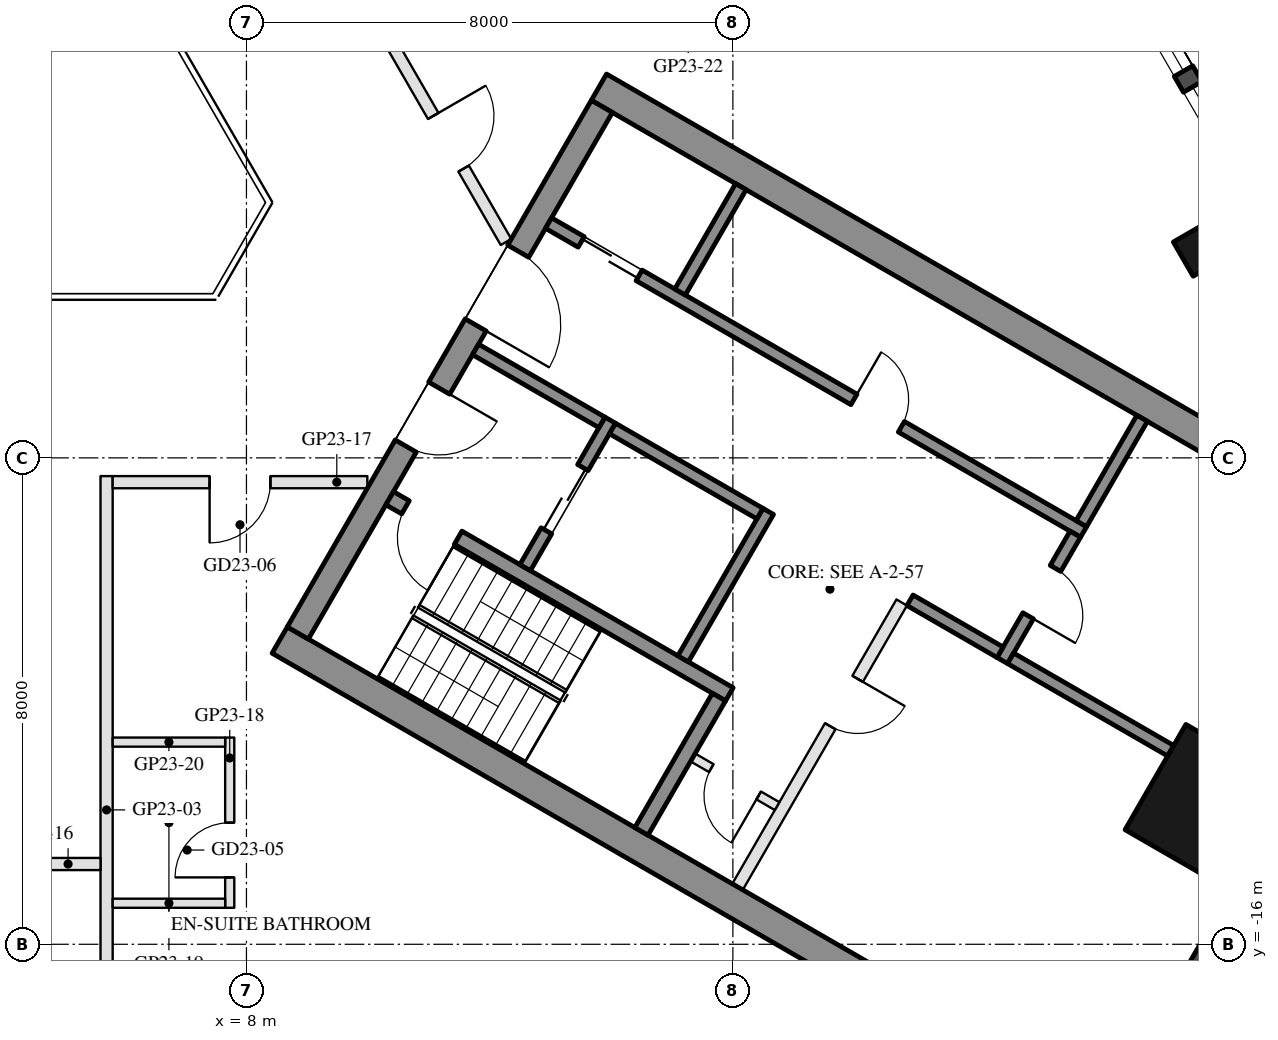
"""IFC4 building model, lengths in metres.
Left out: names, types, materials, properties, quantities, classifications, styles, units other than length and angle.
Written with IfcOpenShell. Run it as: python <this file> out.ifc"""

import sys

from ifc_helpers import new_model, si_unit, direction, frame, frame_2d, origin, origin_2d, place, context, subcontext, project, spatial, rectangle, hollow_rectangle, extrude, element, fill, save


model = new_model("IFC4")
c1 = context("Model", 3, precision=1e-05, world=origin(), true_north=direction((0.0, 1.0)))
c2 = subcontext(c1, "Body", "Model", "MODEL_VIEW")
j1 = project(units=[si_unit("LENGTHUNIT", "METRE"), si_unit("PLANEANGLEUNIT", "RADIAN")], contexts=[c1])
p1 = place(None, origin())
s1 = spatial("IfcSite", under=j1, at=p1, CompositionType="ELEMENT")
p2 = place(p1, origin())
s2 = spatial("IfcBuilding", under=s1, at=p2, CompositionType="ELEMENT")
p3 = place(p2, frame((0.0, 0.0, 246.7)))
s3 = spatial("IfcBuildingStorey", under=s2, at=p3, CompositionType="ELEMENT", Elevation=246.7)
p4 = place(p3, frame((23.688, -4.568, 0.0), z_axis=(0.0, 0.0, 1.0), x_axis=(-0.5, 0.866025403784, 0.0)))
e1 = element("IfcColumn", 1, at=p4, inside=s3, PredefinedType="COLUMN", context=c2, shape_type="SweptSolid", body=[
    extrude(hollow_rectangle(XDim=0.65, YDim=0.65, WallThickness=0.03, at=origin_2d()), origin(), (0.0, 0.0, 1.0), 3.7),
])
p5 = place(p3, frame((23.816, -13.75, 0.0), z_axis=(0.0, 0.0, 1.0), x_axis=(0.5, 0.866025403784, 0.0)))
e2 = element("IfcColumn", 2, at=p5, inside=s3, PredefinedType="COLUMN", context=c2, shape_type="SweptSolid", body=[
    extrude(hollow_rectangle(XDim=2.0, YDim=2.0, WallThickness=0.05, at=origin_2d()), origin(), (0.0, 0.0, 1.0), 3.7),
])
p6 = place(p3, frame((23.427, -16.792, 0.0), z_axis=(0.0, 0.0, 1.0), x_axis=(0.500018773155, 0.866014564827, 0.0)))
e3 = element("IfcWall", 3, at=p6, inside=s3, PredefinedType="SOLIDWALL", context=c2, shape_type="SweptSolid", body=[
    extrude(rectangle(XDim=5.658, YDim=0.35, at=frame_2d((2.829, 0.0))), origin(), (0.0, 0.0, 1.0), 3.55),
])
p7 = place(p3, frame((26.257, -6.567, 0.0), z_axis=(0.0, 0.0, 1.0), x_axis=(-0.500023526245, 0.866011820475, 0.0)))
e4 = element("IfcWall", 4, at=p7, inside=s3, PredefinedType="SOLIDWALL", context=c2, shape_type="SweptSolid", body=[
    extrude(rectangle(XDim=11.816, YDim=0.35, at=frame_2d((5.908, 0.0))), origin(), (0.0, 0.0, 1.0), 3.55),
])
p8 = place(p7, frame((0.38, 0.0, 0.3)))
e5 = element("IfcOpeningElement", 5, at=p8, cuts=e4, PredefinedType="OPENING", context=c2, shape_type="SweptSolid", body=[
    extrude(rectangle(XDim=1.9, YDim=2.65, at=frame_2d((0.95, 1.325))), frame((0.0, 0.185, 0.0), z_axis=(0.0, -1.0, 0.0), x_axis=(1.0, 0.0, 0.0)), (0.0, 0.0, 1.0), 0.37),
])
p9 = place(p7, frame((7.841, 0.0, 0.0)))
e6 = element("IfcOpeningElement", 6, at=p9, cuts=e4, PredefinedType="OPENING", context=c2, shape_type="SweptSolid", body=[
    extrude(rectangle(XDim=2.4, YDim=2.4, at=frame_2d((1.2, 1.2))), frame((0.0, 0.185, 0.0), z_axis=(0.0, -1.0, 0.0), x_axis=(1.0, 0.0, 0.0)), (0.0, 0.0, 1.0), 0.37),
])
p10 = place(p7, frame((3.691, 0.0, 0.3)))
e7 = element("IfcOpeningElement", 7, at=p10, cuts=e4, PredefinedType="OPENING", context=c2, shape_type="SweptSolid", body=[
    extrude(rectangle(XDim=1.7, YDim=2.65, at=frame_2d((0.85, 1.325))), frame((0.0, 0.185, 0.0), z_axis=(0.0, -1.0, 0.0), x_axis=(1.0, 0.0, 0.0)), (0.0, 0.0, 1.0), 0.37),
])
p11 = place(p7, frame((5.691, 0.0, 0.3)))
e8 = element("IfcOpeningElement", 8, at=p11, cuts=e4, PredefinedType="OPENING", context=c2, shape_type="SweptSolid", body=[
    extrude(rectangle(XDim=1.7, YDim=2.65, at=frame_2d((0.85, 1.325))), frame((0.0, 0.185, 0.0), z_axis=(0.0, -1.0, 0.0), x_axis=(1.0, 0.0, 0.0)), (0.0, 0.0, 1.0), 0.37),
])
for number, where, z_axis, x_axis in (
    (9, (8.547, -10.997, 0.0), (0.0, 0.0, 1.0), (0.866, -0.5, 0.0)),
    (10, (13.797, -1.903, 0.0), (0.0, 0.0, 1.0), (0.866, -0.5, 0.0)),
):
    element("IfcWall", number, at=place(p3, frame(where, z_axis=z_axis, x_axis=x_axis)), inside=s3, PredefinedType="SHEAR", context=c2, shape_type="SweptSolid", body=[
        extrude(rectangle(XDim=14.837, YDim=0.5, at=frame_2d((7.418, 0.0))), origin(), (0.0, 0.0, 1.0), 3.5),
    ])
p12 = place(p3, frame((8.845, -10.88, 0.0), z_axis=(0.0, 0.0, 1.0), x_axis=(0.500004234368, 0.866022959057, 0.0)))
e11 = element("IfcWall", 11, at=p12, inside=s3, PredefinedType="SHEAR", context=c2, shape_type="SweptSolid", body=[
    extrude(rectangle(XDim=10.0, YDim=0.4, at=frame_2d((5.0, 0.0))), origin(), (0.0, 0.0, 1.0), 3.5),
])
p13 = place(p12, frame((3.55, 0.0, 0.0)))
e12 = element("IfcOpeningElement", 12, at=p13, cuts=e11, PredefinedType="OPENING", context=c2, shape_type="SweptSolid", body=[
    extrude(rectangle(XDim=1.1, YDim=2.1, at=frame_2d((0.55, 1.05))), frame((0.0, 0.21, 0.0), z_axis=(0.0, -1.0, 0.0), x_axis=(1.0, 0.0, 0.0)), (0.0, 0.0, 1.0), 0.42),
])
p14 = place(p12, frame((5.85, 0.0, 0.0)))
e13 = element("IfcOpeningElement", 13, at=p14, cuts=e11, PredefinedType="OPENING", context=c2, shape_type="SweptSolid", body=[
    extrude(rectangle(XDim=1.4, YDim=2.1, at=frame_2d((0.7, 1.05))), frame((0.0, 0.21, 0.0), z_axis=(0.0, -1.0, 0.0), x_axis=(1.0, 0.0, 0.0)), (0.0, 0.0, 1.0), 0.42),
])
p15 = place(p3, frame((10.356, -8.664, 0.0), z_axis=(0.0, 0.0, 1.0), x_axis=(0.866028629588, -0.499994412703, 0.0)))
e14 = element("IfcWall", 14, at=p15, inside=s3, PredefinedType="SHEAR", context=c2, shape_type="SweptSolid", body=[
    extrude(rectangle(XDim=6.45, YDim=0.25, at=frame_2d((3.225, 0.0))), origin(), (0.0, 0.0, 1.0), 3.5),
])
p16 = place(p15, frame((0.3, 0.0, 0.0)))
e15 = element("IfcOpeningElement", 15, at=p16, cuts=e14, PredefinedType="OPENING", context=c2, shape_type="SweptSolid", body=[
    extrude(rectangle(XDim=1.0, YDim=2.1, at=frame_2d((0.5, 1.05))), frame((0.0, 0.135, 0.0), z_axis=(0.0, -1.0, 0.0), x_axis=(1.0, 0.0, 0.0)), (0.0, 0.0, 1.0), 0.27),
])
p17 = place(p3, frame((14.496, -14.143, 0.0), z_axis=(0.0, 0.0, 1.0), x_axis=(0.500062241894, 0.865989465428, 0.0)))
e16 = element("IfcWall", 16, at=p17, inside=s3, PredefinedType="SHEAR", context=c2, shape_type="SweptSolid", body=[
    extrude(rectangle(XDim=2.55, YDim=0.25, at=frame_2d((1.275, 0.0))), origin(), (0.0, 0.0, 1.0), 3.5),
])
p18 = place(p3, frame((15.181, -11.305, 0.0), z_axis=(0.0, 0.0, 1.0), x_axis=(0.49994636267, 0.866056369097, 0.0)))
e17 = element("IfcWall", 17, at=p18, inside=s3, PredefinedType="SHEAR", context=c2, shape_type="SweptSolid", body=[
    extrude(rectangle(XDim=2.8, YDim=0.2, at=frame_2d((1.4, 0.0))), origin(), (0.0, 0.0, 1.0), 3.5),
])
p19 = place(p3, frame((12.583, -9.805, 0.0), z_axis=(0.0, 0.0, 1.0), x_axis=(0.49994636267, 0.866056369097, 0.0)))
e18 = element("IfcWall", 18, at=p19, inside=s3, PredefinedType="SHEAR", context=c2, shape_type="SweptSolid", body=[
    extrude(rectangle(XDim=2.8, YDim=0.2, at=frame_2d((1.4, 0.0))), origin(), (0.0, 0.0, 1.0), 3.5),
])
p20 = place(p19, frame((0.7, 0.0, 0.0)))
e19 = element("IfcOpeningElement", 19, at=p20, cuts=e18, PredefinedType="OPENING", context=c2, shape_type="SweptSolid", body=[
    extrude(rectangle(XDim=1.2, YDim=2.1, at=frame_2d((0.6, 1.05))), frame((0.0, 0.11, 0.0), z_axis=(0.0, -1.0, 0.0), x_axis=(1.0, 0.0, 0.0)), (0.0, 0.0, 1.0), 0.22),
])
p21 = place(p3, frame((11.768, -6.217, 0.0), z_axis=(0.0, 0.0, 1.0), x_axis=(0.866050077142, -0.499957262057, 0.0)))
e20 = element("IfcWall", 20, at=p21, inside=s3, PredefinedType="SHEAR", context=c2, shape_type="SweptSolid", body=[
    extrude(rectangle(XDim=2.4, YDim=0.2, at=frame_2d((1.2, 0.0))), origin(), (0.0, 0.0, 1.0), 3.5),
])
p22 = place(p3, frame((14.02, -7.517, 0.0), z_axis=(0.0, 0.0, 1.0), x_axis=(0.866034573852, -0.49998411664, 0.0)))
e21 = element("IfcWall", 21, at=p22, inside=s3, PredefinedType="SHEAR", context=c2, shape_type="SweptSolid", body=[
    extrude(rectangle(XDim=2.8, YDim=0.2, at=frame_2d((1.4, 0.0))), origin(), (0.0, 0.0, 1.0), 3.5),
])
p23 = place(p3, frame((12.968, -4.138, 0.0), z_axis=(0.0, 0.0, 1.0), x_axis=(0.866028328073, -0.49999493495, 0.0)))
e22 = element("IfcWall", 22, at=p23, inside=s3, PredefinedType="SHEAR", context=c2, shape_type="SweptSolid", body=[
    extrude(rectangle(XDim=10.16, YDim=0.2, at=frame_2d((5.08, 0.0))), origin(), (0.0, 0.0, 1.0), 3.5),
])
p24 = place(p23, frame((0.62, 0.0, 0.0)))
e23 = element("IfcOpeningElement", 23, at=p24, cuts=e22, PredefinedType="OPENING", context=c2, shape_type="SweptSolid", body=[
    extrude(rectangle(XDim=1.1, YDim=2.1, at=frame_2d((0.55, 1.05))), frame((0.0, 0.11, 0.0), z_axis=(0.0, -1.0, 0.0), x_axis=(1.0, 0.0, 0.0)), (0.0, 0.0, 1.0), 0.22),
])
p25 = place(p23, frame((5.8, 0.0, 0.0)))
e24 = element("IfcOpeningElement", 24, at=p25, cuts=e22, PredefinedType="OPENING", context=c2, shape_type="SweptSolid", body=[
    extrude(rectangle(XDim=0.9, YDim=2.1, at=frame_2d((0.45, 1.05))), frame((0.0, 0.11, 0.0), z_axis=(0.0, -1.0, 0.0), x_axis=(1.0, 0.0, 0.0)), (0.0, 0.0, 1.0), 0.22),
])
p26 = place(p3, frame((20.43, -11.333, 0.0), z_axis=(0.0, 0.0, 1.0), x_axis=(0.500001309137, 0.866024647952, 0.0)))
e25 = element("IfcWall", 25, at=p26, inside=s3, PredefinedType="SHEAR", context=c2, shape_type="SweptSolid", body=[
    extrude(rectangle(XDim=2.4, YDim=0.2, at=frame_2d((1.2, 0.0))), origin(), (0.0, 0.0, 1.0), 3.5),
])
p27 = place(p26, frame((0.85, 0.0, 0.0)))
e26 = element("IfcOpeningElement", 26, at=p27, cuts=e25, PredefinedType="OPENING", context=c2, shape_type="SweptSolid", body=[
    extrude(rectangle(XDim=0.9, YDim=2.1, at=frame_2d((0.45, 1.05))), frame((0.0, 0.11, 0.0), z_axis=(0.0, -1.0, 0.0), x_axis=(1.0, 0.0, 0.0)), (0.0, 0.0, 1.0), 0.22),
])
p28 = place(p3, frame((18.913, -10.342, 0.0), z_axis=(0.0, 0.0, 1.0), x_axis=(0.866038183914, -0.499977863513, 0.0)))
e27 = element("IfcWall", 27, at=p28, inside=s3, PredefinedType="SHEAR", context=c2, shape_type="SweptSolid", body=[
    extrude(rectangle(XDim=1.71, YDim=0.2, at=frame_2d((0.855, 0.0))), origin(), (0.0, 0.0, 1.0), 3.5),
])
for number, where, z_axis, x_axis in (
    (28, (15.131, -5.272, 0.0), (0.0, 0.0, 1.0), (0.5, 0.866, 0.0)),
    (29, (21.73, -9.082, 0.0), (0.0, 0.0, 1.0), (0.5, 0.866, 0.0)),
):
    element("IfcWall", number, at=place(p3, frame(where, z_axis=z_axis, x_axis=x_axis)), inside=s3, PredefinedType="SHEAR", context=c2, shape_type="SweptSolid", body=[
        extrude(rectangle(XDim=2.0, YDim=0.2, at=frame_2d((1.0, 0.0))), origin(), (0.0, 0.0, 1.0), 3.5),
    ])
p29 = place(p3, frame((20.567, -11.297, 0.0), z_axis=(0.0, 0.0, 1.0), x_axis=(0.866065229334, -0.49993101378, 0.0)))
e30 = element("IfcWall", 30, at=p29, inside=s3, PredefinedType="SHEAR", context=c2, shape_type="SweptSolid", body=[
    extrude(rectangle(XDim=3.04, YDim=0.2, at=frame_2d((1.52, 0.0))), origin(), (0.0, 0.0, 1.0), 3.5),
])
p30 = place(p3, frame((16.076, -15.055, 0.0), z_axis=(0.0, 0.0, 1.0), x_axis=(0.499995103361, 0.866028230842, 0.0)))
e31 = element("IfcWall", 31, at=p30, inside=s3, PredefinedType="PARTITIONING", context=c2, shape_type="SweptSolid", body=[
    extrude(rectangle(XDim=5.4, YDim=0.2, at=frame_2d((2.7, 0.0))), origin(), (0.0, 0.0, 1.0), 3.5),
])
p31 = place(p30, frame((3.05, 0.0, 0.0)))
e32 = element("IfcOpeningElement", 32, at=p31, cuts=e31, PredefinedType="OPENING", context=c2, shape_type="SweptSolid", body=[
    extrude(rectangle(XDim=0.9, YDim=2.1, at=frame_2d((0.45, 1.05))), frame((0.0, 0.11, 0.0), z_axis=(0.0, -1.0, 0.0), x_axis=(1.0, 0.0, 0.0)), (0.0, 0.0, 1.0), 0.22),
])
p32 = place(p3, frame((15.342, -12.928, 0.0), z_axis=(0.0, 0.0, 1.0), x_axis=(0.865989903783, -0.500061482766, 0.0)))
e33 = element("IfcWall", 33, at=p32, inside=s3, PredefinedType="PARTITIONING", context=c2, shape_type="SweptSolid", body=[
    extrude(rectangle(XDim=1.6, YDim=0.15, at=frame_2d((0.8, 0.0))), origin(), (0.0, 0.0, 1.0), 3.5),
])
p33 = place(p32, frame((0.35, 0.0, 0.0)))
e34 = element("IfcOpeningElement", 34, at=p33, cuts=e33, PredefinedType="OPENING", context=c2, shape_type="SweptSolid", body=[
    extrude(rectangle(XDim=0.9, YDim=2.1, at=frame_2d((0.45, 1.05))), frame((0.0, 0.085, 0.0), z_axis=(0.0, -1.0, 0.0), x_axis=(1.0, 0.0, 0.0)), (0.0, 0.0, 1.0), 0.17),
])
p34 = place(p3, frame((5.7, -19.28, 0.0), z_axis=(0.0, 0.0, 1.0), x_axis=(0.0, 1.0, 0.0)))
e35 = element("IfcWall", 35, at=p34, inside=s3, PredefinedType="PARTITIONING", context=c2, shape_type="SweptSolid", body=[
    extrude(rectangle(XDim=10.98, YDim=0.2, at=frame_2d((5.49, 0.0))), origin(), (0.0, 0.0, 1.0), 3.16),
])
p35 = place(p3, frame((5.6, -14.68, 0.0), z_axis=(0.0, 0.0, 1.0), x_axis=(-1.0, 0.0, 0.0)))
e36 = element("IfcWall", 36, at=p35, inside=s3, PredefinedType="PARTITIONING", context=c2, shape_type="SweptSolid", body=[
    extrude(rectangle(XDim=4.445, YDim=0.2, at=frame_2d((2.223, 0.0))), origin(), (0.0, 0.0, 1.0), 2.95),
])
p36 = place(p35, frame((1.723, 0.0, 0.0)))
e37 = element("IfcOpeningElement", 37, at=p36, cuts=e36, PredefinedType="OPENING", context=c2, shape_type="SweptSolid", body=[
    extrude(rectangle(XDim=1.0, YDim=2.1, at=frame_2d((0.5, 1.05))), frame((0.0, 0.11, 0.0), z_axis=(0.0, -1.0, 0.0), x_axis=(1.0, 0.0, 0.0)), (0.0, 0.0, 1.0), 0.22),
])
p37 = place(p3, frame((9.988, -8.4, 0.0), z_axis=(0.0, 0.0, 1.0), x_axis=(-1.0, 0.0, 0.0)))
e38 = element("IfcWall", 38, at=p37, inside=s3, PredefinedType="PARTITIONING", context=c2, shape_type="SweptSolid", body=[
    extrude(rectangle(XDim=4.188, YDim=0.2, at=frame_2d((2.094, 0.0))), origin(), (0.0, 0.0, 1.0), 2.95),
])
p38 = place(p37, frame((1.594, 0.0, 0.0)))
e39 = element("IfcOpeningElement", 39, at=p38, cuts=e38, PredefinedType="OPENING", context=c2, shape_type="SweptSolid", body=[
    extrude(rectangle(XDim=1.0, YDim=2.1, at=frame_2d((0.5, 1.05))), frame((0.0, 0.11, 0.0), z_axis=(0.0, -1.0, 0.0), x_axis=(1.0, 0.0, 0.0)), (0.0, 0.0, 1.0), 0.22),
])
p39 = place(p3, frame((7.725, -15.4, 0.0), z_axis=(0.0, 0.0, 1.0), x_axis=(0.0, 1.0, 0.0)))
e40 = element("IfcWall", 40, at=p39, inside=s3, PredefinedType="PARTITIONING", context=c2, shape_type="SweptSolid", body=[
    extrude(rectangle(XDim=2.8, YDim=0.15, at=frame_2d((1.4, 0.0))), origin(), (0.0, 0.0, 1.0), 2.95),
])
p40 = place(p39, frame((0.5, 0.0, 0.0)))
e41 = element("IfcOpeningElement", 41, at=p40, cuts=e40, PredefinedType="OPENING", context=c2, shape_type="SweptSolid", body=[
    extrude(rectangle(XDim=0.9, YDim=2.1, at=frame_2d((0.45, 1.05))), frame((0.0, 0.085, 0.0), z_axis=(0.0, -1.0, 0.0), x_axis=(1.0, 0.0, 0.0)), (0.0, 0.0, 1.0), 0.17),
])
for number, where, z_axis, x_axis in (
    (42, (5.8, -15.325, 0.0), (0.0, 0.0, 1.0), (1.0, 0.0, 0.0)),
    (43, (5.8, -12.675, 0.0), (0.0, 0.0, 1.0), (1.0, 0.0, 0.0)),
):
    element("IfcWall", number, at=place(p3, frame(where, z_axis=z_axis, x_axis=x_axis)), inside=s3, PredefinedType="PARTITIONING", context=c2, shape_type="SweptSolid", body=[
        extrude(rectangle(XDim=1.85, YDim=0.15, at=frame_2d((0.925, 0.0))), origin(), (0.0, 0.0, 1.0), 3.55),
    ])
p41 = place(p3, frame((10.375, -1.169, 0.0), z_axis=(0.0, 0.0, 1.0), x_axis=(0.500055316652, -0.865993464345, 0.0)))
e44 = element("IfcWall", 44, at=p41, inside=s3, PredefinedType="PARTITIONING", context=c2, shape_type="SweptSolid", body=[
    extrude(rectangle(XDim=3.788, YDim=0.2, at=frame_2d((1.894, 0.0))), origin(), (0.0, 0.0, 1.0), 2.95),
])
p42 = place(p41, frame((1.394, 0.0, 0.0)))
e45 = element("IfcOpeningElement", 45, at=p42, cuts=e44, PredefinedType="OPENING", context=c2, shape_type="SweptSolid", body=[
    extrude(rectangle(XDim=1.0, YDim=2.1, at=frame_2d((0.5, 1.05))), frame((0.0, 0.11, 0.0), z_axis=(0.0, -1.0, 0.0), x_axis=(1.0, 0.0, 0.0)), (0.0, 0.0, 1.0), 0.22),
])
p43 = place(p10, origin())
e46 = element("IfcWindow", 46, at=p43, inside=s3, PartitioningType="SINGLE_PANEL", PredefinedType="WINDOW", context=c2, shape_type="SweptSolid", body=[
    extrude(rectangle(XDim=1.7, YDim=2.65, at=frame_2d((0.85, 1.325))), frame((0.0, 0.03, 0.0), z_axis=(0.0, -1.0, 0.0), x_axis=(1.0, 0.0, 0.0)), (0.0, 0.0, 1.0), 0.06),
])
fill(e7, e46)
p44 = place(p11, origin())
e47 = element("IfcWindow", 47, at=p44, inside=s3, PartitioningType="SINGLE_PANEL", PredefinedType="WINDOW", context=c2, shape_type="SweptSolid", body=[
    extrude(rectangle(XDim=1.7, YDim=2.65, at=frame_2d((0.85, 1.325))), frame((0.0, 0.03, 0.0), z_axis=(0.0, -1.0, 0.0), x_axis=(1.0, 0.0, 0.0)), (0.0, 0.0, 1.0), 0.06),
])
fill(e8, e47)
p45 = place(p20, origin())
e48 = element("IfcDoor", 48, at=p45, inside=s3, OperationType="DOUBLE_DOOR_SLIDING", PredefinedType="DOOR", context=c2, shape_type="SweptSolid", body=[
    extrude(rectangle(XDim=1.2, YDim=2.1, at=frame_2d((0.6, 1.05))), frame((0.0, 0.025, 0.0), z_axis=(0.0, -1.0, 0.0), x_axis=(1.0, 0.0, 0.0)), (0.0, 0.0, 1.0), 0.05),
])
fill(e19, e48)
p46 = place(p33, frame((0.9, 0.0, 0.0), z_axis=(0.0, 0.0, 1.0), x_axis=(-1.0, 0.0, 0.0)))
e49 = element("IfcDoor", 49, at=p46, inside=s3, OperationType="SINGLE_SWING_LEFT", PredefinedType="DOOR", context=c2, shape_type="SweptSolid", body=[
    extrude(rectangle(XDim=0.9, YDim=2.1, at=frame_2d((0.45, 1.05))), frame((0.0, 0.025, 0.0), z_axis=(0.0, -1.0, 0.0), x_axis=(1.0, 0.0, 0.0)), (0.0, 0.0, 1.0), 0.05),
])
fill(e34, e49)
p47 = place(p24, origin())
e50 = element("IfcDoor", 50, at=p47, inside=s3, OperationType="DOUBLE_DOOR_SLIDING", PredefinedType="DOOR", context=c2, shape_type="SweptSolid", body=[
    extrude(rectangle(XDim=1.1, YDim=2.1, at=frame_2d((0.55, 1.05))), frame((0.0, 0.025, 0.0), z_axis=(0.0, -1.0, 0.0), x_axis=(1.0, 0.0, 0.0)), (0.0, 0.0, 1.0), 0.05),
])
fill(e23, e50)
p48 = place(p25, origin())
e51 = element("IfcDoor", 51, at=p48, inside=s3, OperationType="SINGLE_SWING_LEFT", PredefinedType="DOOR", context=c2, shape_type="SweptSolid", body=[
    extrude(rectangle(XDim=0.9, YDim=2.1, at=frame_2d((0.45, 1.05))), frame((0.0, 0.025, 0.0), z_axis=(0.0, -1.0, 0.0), x_axis=(1.0, 0.0, 0.0)), (0.0, 0.0, 1.0), 0.05),
])
fill(e24, e51)
p49 = place(p27, frame((0.9, 0.0, 0.0), z_axis=(0.0, 0.0, 1.0), x_axis=(-1.0, 0.0, 0.0)))
e52 = element("IfcDoor", 52, at=p49, inside=s3, OperationType="SINGLE_SWING_RIGHT", PredefinedType="DOOR", context=c2, shape_type="SweptSolid", body=[
    extrude(rectangle(XDim=0.9, YDim=2.1, at=frame_2d((0.45, 1.05))), frame((0.0, 0.025, 0.0), z_axis=(0.0, -1.0, 0.0), x_axis=(1.0, 0.0, 0.0)), (0.0, 0.0, 1.0), 0.05),
])
fill(e26, e52)
p50 = place(p31, frame((0.9, 0.0, 0.0), z_axis=(0.0, 0.0, 1.0), x_axis=(-1.0, 0.0, 0.0)))
e53 = element("IfcDoor", 53, at=p50, inside=s3, OperationType="SINGLE_SWING_LEFT", PredefinedType="DOOR", context=c2, shape_type="SweptSolid", body=[
    extrude(rectangle(XDim=0.9, YDim=2.1, at=frame_2d((0.45, 1.05))), frame((0.0, 0.025, 0.0), z_axis=(0.0, -1.0, 0.0), x_axis=(1.0, 0.0, 0.0)), (0.0, 0.0, 1.0), 0.05),
])
fill(e32, e53)
p51 = place(p13, frame((1.1, 0.0, 0.0), z_axis=(0.0, 0.0, 1.0), x_axis=(-1.0, 0.0, 0.0)))
e54 = element("IfcDoor", 54, at=p51, inside=s3, OperationType="SINGLE_SWING_LEFT", PredefinedType="DOOR", context=c2, shape_type="SweptSolid", body=[
    extrude(rectangle(XDim=1.1, YDim=2.1, at=frame_2d((0.55, 1.05))), frame((0.0, 0.025, 0.0), z_axis=(0.0, -1.0, 0.0), x_axis=(1.0, 0.0, 0.0)), (0.0, 0.0, 1.0), 0.05),
])
fill(e12, e54)
p52 = place(p14, frame((1.4, 0.0, 0.0), z_axis=(0.0, 0.0, 1.0), x_axis=(-1.0, 0.0, 0.0)))
e55 = element("IfcDoor", 55, at=p52, inside=s3, OperationType="DOUBLE_DOOR_SINGLE_SWING", PredefinedType="DOOR", context=c2, shape_type="SweptSolid", body=[
    extrude(rectangle(XDim=1.4, YDim=2.1, at=frame_2d((0.7, 1.05))), frame((0.0, 0.025, 0.0), z_axis=(0.0, -1.0, 0.0), x_axis=(1.0, 0.0, 0.0)), (0.0, 0.0, 1.0), 0.05),
])
fill(e13, e55)
p53 = place(p16, frame((1.0, 0.0, 0.0), z_axis=(0.0, 0.0, 1.0), x_axis=(-1.0, 0.0, 0.0)))
e56 = element("IfcDoor", 56, at=p53, inside=s3, OperationType="SINGLE_SWING_LEFT", PredefinedType="DOOR", context=c2, shape_type="SweptSolid", body=[
    extrude(rectangle(XDim=1.0, YDim=2.1, at=frame_2d((0.5, 1.05))), frame((0.0, 0.025, 0.0), z_axis=(0.0, -1.0, 0.0), x_axis=(1.0, 0.0, 0.0)), (0.0, 0.0, 1.0), 0.05),
])
fill(e15, e56)
p54 = place(p40, origin())
e57 = element("IfcDoor", 57, at=p54, inside=s3, OperationType="SINGLE_SWING_LEFT", PredefinedType="DOOR", context=c2, shape_type="SweptSolid", body=[
    extrude(rectangle(XDim=0.9, YDim=2.1, at=frame_2d((0.45, 1.05))), frame((0.0, 0.025, 0.0), z_axis=(0.0, -1.0, 0.0), x_axis=(1.0, 0.0, 0.0)), (0.0, 0.0, 1.0), 0.05),
])
fill(e41, e57)
p55 = place(p38, origin())
e58 = element("IfcDoor", 58, at=p55, inside=s3, OperationType="SINGLE_SWING_RIGHT", PredefinedType="DOOR", context=c2, shape_type="SweptSolid", body=[
    extrude(rectangle(XDim=1.0, YDim=2.1, at=frame_2d((0.5, 1.05))), frame((0.0, 0.025, 0.0), z_axis=(0.0, -1.0, 0.0), x_axis=(1.0, 0.0, 0.0)), (0.0, 0.0, 1.0), 0.05),
])
fill(e39, e58)
p56 = place(p42, origin())
e59 = element("IfcDoor", 59, at=p56, inside=s3, OperationType="SINGLE_SWING_LEFT", PredefinedType="DOOR", context=c2, shape_type="SweptSolid", body=[
    extrude(rectangle(XDim=1.0, YDim=2.1, at=frame_2d((0.5, 1.05))), frame((0.0, 0.025, 0.0), z_axis=(0.0, -1.0, 0.0), x_axis=(1.0, 0.0, 0.0)), (0.0, 0.0, 1.0), 0.05),
])
fill(e45, e59)
save(model, sys.argv[1])
